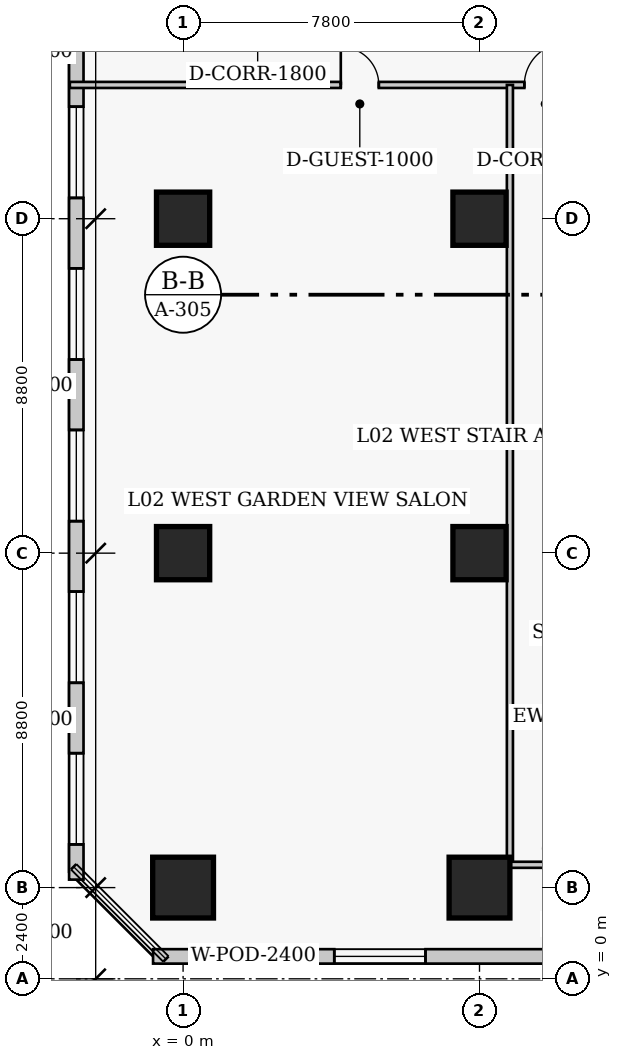
"""IFC4 building model, lengths in metres.
Left out: names, types, materials, properties, quantities, classifications, styles, units other than length and angle.
Written with IfcOpenShell. Run it as: python <this file> out.ifc"""

import sys

from ifc_helpers import new_model, si_unit, direction, frame, frame_2d, origin, origin_2d, place, context, subcontext, project, spatial, rectangle, extrude, element, fill, save


model = new_model("IFC4")
c1 = context("Model", 3, precision=1e-05, world=origin(), true_north=direction((0.0, 1.0)))
c2 = subcontext(c1, "Body", "Model", "MODEL_VIEW")
j1 = project(units=[si_unit("LENGTHUNIT", "METRE"), si_unit("PLANEANGLEUNIT", "RADIAN")], contexts=[c1])
p1 = place(None, origin())
s1 = spatial("IfcSite", under=j1, at=p1, CompositionType="ELEMENT")
p2 = place(p1, origin())
s2 = spatial("IfcBuilding", under=s1, at=p2, CompositionType="ELEMENT")
p3 = place(p2, frame((0.0, 0.0, 10.4)))
s3 = spatial("IfcBuildingStorey", under=s2, at=p3, CompositionType="ELEMENT", Elevation=10.4)
p4 = place(p3, frame((0.0, 2.4, 0.0), z_axis=(0.0, 0.0, 1.0), x_axis=(1.0, 0.0, 0.0)))
e1 = element("IfcColumn", 1, at=p4, inside=s3, PredefinedType="COLUMN", context=c2, shape_type="SweptSolid", body=[
    extrude(rectangle(XDim=1.6, YDim=1.6, at=origin_2d()), origin(), (0.0, 0.0, 1.0), 5.4),
])
for number, where, z_axis, x_axis in (
    (2, (0.0, 11.2, 0.0), (0.0, 0.0, 1.0), (1.0, 0.0, 0.0)),
    (3, (0.0, 20.0, 0.0), (0.0, 0.0, 1.0), (1.0, 0.0, 0.0)),
):
    element("IfcColumn", number, at=place(p3, frame(where, z_axis=z_axis, x_axis=x_axis)), inside=s3, PredefinedType="COLUMN", context=c2, shape_type="SweptSolid", body=[
        extrude(rectangle(XDim=1.4, YDim=1.4, at=origin_2d()), origin(), (0.0, 0.0, 1.0), 5.4),
    ])
p5 = place(p3, frame((7.8, 2.4, 0.0), z_axis=(0.0, 0.0, 1.0), x_axis=(1.0, 0.0, 0.0)))
e4 = element("IfcColumn", 4, at=p5, inside=s3, PredefinedType="COLUMN", context=c2, shape_type="SweptSolid", body=[
    extrude(rectangle(XDim=1.6, YDim=1.6, at=origin_2d()), origin(), (0.0, 0.0, 1.0), 5.4),
])
for number, where, z_axis, x_axis in (
    (5, (7.8, 11.2, 0.0), (0.0, 0.0, 1.0), (1.0, 0.0, 0.0)),
    (6, (7.8, 20.0, 0.0), (0.0, 0.0, 1.0), (1.0, 0.0, 0.0)),
):
    element("IfcColumn", number, at=place(p3, frame(where, z_axis=z_axis, x_axis=x_axis)), inside=s3, PredefinedType="COLUMN", context=c2, shape_type="SweptSolid", body=[
        extrude(rectangle(XDim=1.4, YDim=1.4, at=origin_2d()), origin(), (0.0, 0.0, 1.0), 5.4),
    ])
p6 = place(p3, frame((-0.79, 0.59, 0.0), z_axis=(0.0, 0.0, 1.0), x_axis=(1.0, 0.0, 0.0)))
e7 = element("IfcWall", 7, at=p6, inside=s3, PredefinedType="SOLIDWALL", context=c2, shape_type="SweptSolid", body=[
    extrude(rectangle(XDim=79.58, YDim=0.38, at=frame_2d((39.79, 0.0))), origin(), (0.0, 0.0, 1.0), 5.1),
])
p7 = place(p6, frame((1.439, 0.0, 0.75)))
e8 = element("IfcOpeningElement", 8, at=p7, cuts=e7, PredefinedType="OPENING", context=c2, shape_type="SweptSolid", body=[
    extrude(rectangle(XDim=2.4, YDim=2.2, at=frame_2d((1.2, 1.1))), frame((0.0, 0.2, 0.0), z_axis=(0.0, -1.0, 0.0), x_axis=(1.0, 0.0, 0.0)), (0.0, 0.0, 1.0), 0.4),
])
p8 = place(p6, frame((4.769, 0.0, 0.75)))
e9 = element("IfcOpeningElement", 9, at=p8, cuts=e7, PredefinedType="OPENING", context=c2, shape_type="SweptSolid", body=[
    extrude(rectangle(XDim=2.4, YDim=2.2, at=frame_2d((1.2, 1.1))), frame((0.0, 0.2, 0.0), z_axis=(0.0, -1.0, 0.0), x_axis=(1.0, 0.0, 0.0)), (0.0, 0.0, 1.0), 0.4),
])
p9 = place(p6, frame((16.706, 0.0, 0.75)))
e10 = element("IfcOpeningElement", 10, at=p9, cuts=e7, PredefinedType="OPENING", context=c2, shape_type="SweptSolid", body=[
    extrude(rectangle(XDim=2.4, YDim=2.2, at=frame_2d((1.2, 1.1))), frame((0.0, 0.2, 0.0), z_axis=(0.0, -1.0, 0.0), x_axis=(1.0, 0.0, 0.0)), (0.0, 0.0, 1.0), 0.4),
])
p10 = place(p6, frame((20.685, 0.0, 0.75)))
e11 = element("IfcOpeningElement", 11, at=p10, cuts=e7, PredefinedType="OPENING", context=c2, shape_type="SweptSolid", body=[
    extrude(rectangle(XDim=2.4, YDim=2.2, at=frame_2d((1.2, 1.1))), frame((0.0, 0.2, 0.0), z_axis=(0.0, -1.0, 0.0), x_axis=(1.0, 0.0, 0.0)), (0.0, 0.0, 1.0), 0.4),
])
p11 = place(p6, frame((24.664, 0.0, 0.75)))
e12 = element("IfcOpeningElement", 12, at=p11, cuts=e7, PredefinedType="OPENING", context=c2, shape_type="SweptSolid", body=[
    extrude(rectangle(XDim=2.4, YDim=2.2, at=frame_2d((1.2, 1.1))), frame((0.0, 0.2, 0.0), z_axis=(0.0, -1.0, 0.0), x_axis=(1.0, 0.0, 0.0)), (0.0, 0.0, 1.0), 0.4),
])
p12 = place(p6, frame((28.643, 0.0, 0.75)))
e13 = element("IfcOpeningElement", 13, at=p12, cuts=e7, PredefinedType="OPENING", context=c2, shape_type="SweptSolid", body=[
    extrude(rectangle(XDim=2.4, YDim=2.2, at=frame_2d((1.2, 1.1))), frame((0.0, 0.2, 0.0), z_axis=(0.0, -1.0, 0.0), x_axis=(1.0, 0.0, 0.0)), (0.0, 0.0, 1.0), 0.4),
])
p13 = place(p6, frame((33.271, 0.0, 0.75)))
e14 = element("IfcOpeningElement", 14, at=p13, cuts=e7, PredefinedType="OPENING", context=c2, shape_type="SweptSolid", body=[
    extrude(rectangle(XDim=2.4, YDim=2.2, at=frame_2d((1.2, 1.1))), frame((0.0, 0.2, 0.0), z_axis=(0.0, -1.0, 0.0), x_axis=(1.0, 0.0, 0.0)), (0.0, 0.0, 1.0), 0.4),
])
p14 = place(p6, frame((37.75, 0.0, 0.75)))
e15 = element("IfcOpeningElement", 15, at=p14, cuts=e7, PredefinedType="OPENING", context=c2, shape_type="SweptSolid", body=[
    extrude(rectangle(XDim=2.4, YDim=2.2, at=frame_2d((1.2, 1.1))), frame((0.0, 0.2, 0.0), z_axis=(0.0, -1.0, 0.0), x_axis=(1.0, 0.0, 0.0)), (0.0, 0.0, 1.0), 0.4),
])
p15 = place(p6, frame((44.559, 0.0, 0.75)))
e16 = element("IfcOpeningElement", 16, at=p15, cuts=e7, PredefinedType="OPENING", context=c2, shape_type="SweptSolid", body=[
    extrude(rectangle(XDim=2.4, YDim=2.2, at=frame_2d((1.2, 1.1))), frame((0.0, 0.2, 0.0), z_axis=(0.0, -1.0, 0.0), x_axis=(1.0, 0.0, 0.0)), (0.0, 0.0, 1.0), 0.4),
])
p16 = place(p6, frame((48.538, 0.0, 0.75)))
e17 = element("IfcOpeningElement", 17, at=p16, cuts=e7, PredefinedType="OPENING", context=c2, shape_type="SweptSolid", body=[
    extrude(rectangle(XDim=2.4, YDim=2.2, at=frame_2d((1.2, 1.1))), frame((0.0, 0.2, 0.0), z_axis=(0.0, -1.0, 0.0), x_axis=(1.0, 0.0, 0.0)), (0.0, 0.0, 1.0), 0.4),
])
p17 = place(p6, frame((52.517, 0.0, 0.75)))
e18 = element("IfcOpeningElement", 18, at=p17, cuts=e7, PredefinedType="OPENING", context=c2, shape_type="SweptSolid", body=[
    extrude(rectangle(XDim=2.4, YDim=2.2, at=frame_2d((1.2, 1.1))), frame((0.0, 0.2, 0.0), z_axis=(0.0, -1.0, 0.0), x_axis=(1.0, 0.0, 0.0)), (0.0, 0.0, 1.0), 0.4),
])
p18 = place(p6, frame((56.496, 0.0, 0.75)))
e19 = element("IfcOpeningElement", 19, at=p18, cuts=e7, PredefinedType="OPENING", context=c2, shape_type="SweptSolid", body=[
    extrude(rectangle(XDim=2.4, YDim=2.2, at=frame_2d((1.2, 1.1))), frame((0.0, 0.2, 0.0), z_axis=(0.0, -1.0, 0.0), x_axis=(1.0, 0.0, 0.0)), (0.0, 0.0, 1.0), 0.4),
])
p19 = place(p6, frame((60.475, 0.0, 0.75)))
e20 = element("IfcOpeningElement", 20, at=p19, cuts=e7, PredefinedType="OPENING", context=c2, shape_type="SweptSolid", body=[
    extrude(rectangle(XDim=2.4, YDim=2.2, at=frame_2d((1.2, 1.1))), frame((0.0, 0.2, 0.0), z_axis=(0.0, -1.0, 0.0), x_axis=(1.0, 0.0, 0.0)), (0.0, 0.0, 1.0), 0.4),
])
p20 = place(p6, frame((64.454, 0.0, 0.75)))
e21 = element("IfcOpeningElement", 21, at=p20, cuts=e7, PredefinedType="OPENING", context=c2, shape_type="SweptSolid", body=[
    extrude(rectangle(XDim=2.4, YDim=2.2, at=frame_2d((1.2, 1.1))), frame((0.0, 0.2, 0.0), z_axis=(0.0, -1.0, 0.0), x_axis=(1.0, 0.0, 0.0)), (0.0, 0.0, 1.0), 0.4),
])
p21 = place(p6, frame((68.433, 0.0, 0.75)))
e22 = element("IfcOpeningElement", 22, at=p21, cuts=e7, PredefinedType="OPENING", context=c2, shape_type="SweptSolid", body=[
    extrude(rectangle(XDim=2.4, YDim=2.2, at=frame_2d((1.2, 1.1))), frame((0.0, 0.2, 0.0), z_axis=(0.0, -1.0, 0.0), x_axis=(1.0, 0.0, 0.0)), (0.0, 0.0, 1.0), 0.4),
])
p22 = place(p6, frame((72.412, 0.0, 0.75)))
e23 = element("IfcOpeningElement", 23, at=p22, cuts=e7, PredefinedType="OPENING", context=c2, shape_type="SweptSolid", body=[
    extrude(rectangle(XDim=2.4, YDim=2.2, at=frame_2d((1.2, 1.1))), frame((0.0, 0.2, 0.0), z_axis=(0.0, -1.0, 0.0), x_axis=(1.0, 0.0, 0.0)), (0.0, 0.0, 1.0), 0.4),
])
p23 = place(p6, frame((75.74, 0.0, 0.75)))
e24 = element("IfcOpeningElement", 24, at=p23, cuts=e7, PredefinedType="OPENING", context=c2, shape_type="SweptSolid", body=[
    extrude(rectangle(XDim=2.4, YDim=2.2, at=frame_2d((1.2, 1.1))), frame((0.0, 0.2, 0.0), z_axis=(0.0, -1.0, 0.0), x_axis=(1.0, 0.0, 0.0)), (0.0, 0.0, 1.0), 0.4),
])
p24 = place(p3, frame((-2.81, 49.39, 0.0), z_axis=(0.0, 0.0, 1.0), x_axis=(0.0, -1.0, 0.0)))
e25 = element("IfcWall", 25, at=p24, inside=s3, PredefinedType="SOLIDWALL", context=c2, shape_type="SweptSolid", body=[
    extrude(rectangle(XDim=46.78, YDim=0.38, at=frame_2d((23.39, 0.0))), origin(), (0.0, 0.0, 1.0), 5.1),
])
p25 = place(p24, frame((0.927, 0.0, 0.75)))
e26 = element("IfcOpeningElement", 26, at=p25, cuts=e25, PredefinedType="OPENING", context=c2, shape_type="SweptSolid", body=[
    extrude(rectangle(XDim=2.4, YDim=2.2, at=frame_2d((1.2, 1.1))), frame((0.0, 0.2, 0.0), z_axis=(0.0, -1.0, 0.0), x_axis=(1.0, 0.0, 0.0)), (0.0, 0.0, 1.0), 0.4),
])
p26 = place(p24, frame((5.179, 0.0, 0.75)))
e27 = element("IfcOpeningElement", 27, at=p26, cuts=e25, PredefinedType="OPENING", context=c2, shape_type="SweptSolid", body=[
    extrude(rectangle(XDim=2.4, YDim=2.2, at=frame_2d((1.2, 1.1))), frame((0.0, 0.2, 0.0), z_axis=(0.0, -1.0, 0.0), x_axis=(1.0, 0.0, 0.0)), (0.0, 0.0, 1.0), 0.4),
])
p27 = place(p24, frame((9.432, 0.0, 0.75)))
e28 = element("IfcOpeningElement", 28, at=p27, cuts=e25, PredefinedType="OPENING", context=c2, shape_type="SweptSolid", body=[
    extrude(rectangle(XDim=2.4, YDim=2.2, at=frame_2d((1.2, 1.1))), frame((0.0, 0.2, 0.0), z_axis=(0.0, -1.0, 0.0), x_axis=(1.0, 0.0, 0.0)), (0.0, 0.0, 1.0), 0.4),
])
p28 = place(p24, frame((13.685, 0.0, 0.75)))
e29 = element("IfcOpeningElement", 29, at=p28, cuts=e25, PredefinedType="OPENING", context=c2, shape_type="SweptSolid", body=[
    extrude(rectangle(XDim=2.4, YDim=2.2, at=frame_2d((1.2, 1.1))), frame((0.0, 0.2, 0.0), z_axis=(0.0, -1.0, 0.0), x_axis=(1.0, 0.0, 0.0)), (0.0, 0.0, 1.0), 0.4),
])
p29 = place(p24, frame((17.937, 0.0, 0.75)))
e30 = element("IfcOpeningElement", 30, at=p29, cuts=e25, PredefinedType="OPENING", context=c2, shape_type="SweptSolid", body=[
    extrude(rectangle(XDim=2.4, YDim=2.2, at=frame_2d((1.2, 1.1))), frame((0.0, 0.2, 0.0), z_axis=(0.0, -1.0, 0.0), x_axis=(1.0, 0.0, 0.0)), (0.0, 0.0, 1.0), 0.4),
])
p30 = place(p24, frame((26.443, 0.0, 0.75)))
e31 = element("IfcOpeningElement", 31, at=p30, cuts=e25, PredefinedType="OPENING", context=c2, shape_type="SweptSolid", body=[
    extrude(rectangle(XDim=2.4, YDim=2.2, at=frame_2d((1.2, 1.1))), frame((0.0, 0.2, 0.0), z_axis=(0.0, -1.0, 0.0), x_axis=(1.0, 0.0, 0.0)), (0.0, 0.0, 1.0), 0.4),
])
p31 = place(p24, frame((30.696, 0.0, 0.75)))
e32 = element("IfcOpeningElement", 32, at=p31, cuts=e25, PredefinedType="OPENING", context=c2, shape_type="SweptSolid", body=[
    extrude(rectangle(XDim=2.4, YDim=2.2, at=frame_2d((1.2, 1.1))), frame((0.0, 0.2, 0.0), z_axis=(0.0, -1.0, 0.0), x_axis=(1.0, 0.0, 0.0)), (0.0, 0.0, 1.0), 0.4),
])
p32 = place(p24, frame((34.948, 0.0, 0.75)))
e33 = element("IfcOpeningElement", 33, at=p32, cuts=e25, PredefinedType="OPENING", context=c2, shape_type="SweptSolid", body=[
    extrude(rectangle(XDim=2.4, YDim=2.2, at=frame_2d((1.2, 1.1))), frame((0.0, 0.2, 0.0), z_axis=(0.0, -1.0, 0.0), x_axis=(1.0, 0.0, 0.0)), (0.0, 0.0, 1.0), 0.4),
])
p33 = place(p24, frame((39.201, 0.0, 0.75)))
e34 = element("IfcOpeningElement", 34, at=p33, cuts=e25, PredefinedType="OPENING", context=c2, shape_type="SweptSolid", body=[
    extrude(rectangle(XDim=2.4, YDim=2.2, at=frame_2d((1.2, 1.1))), frame((0.0, 0.2, 0.0), z_axis=(0.0, -1.0, 0.0), x_axis=(1.0, 0.0, 0.0)), (0.0, 0.0, 1.0), 0.4),
])
p34 = place(p24, frame((43.454, 0.0, 0.75)))
e35 = element("IfcOpeningElement", 35, at=p34, cuts=e25, PredefinedType="OPENING", context=c2, shape_type="SweptSolid", body=[
    extrude(rectangle(XDim=2.4, YDim=2.2, at=frame_2d((1.2, 1.1))), frame((0.0, 0.2, 0.0), z_axis=(0.0, -1.0, 0.0), x_axis=(1.0, 0.0, 0.0)), (0.0, 0.0, 1.0), 0.4),
])
p35 = place(p3, frame((-2.98, 23.52, 0.0), z_axis=(0.0, 0.0, 1.0), x_axis=(1.0, 0.0, 0.0)))
e36 = element("IfcWall", 36, at=p35, inside=s3, PredefinedType="PARTITIONING", context=c2, shape_type="SweptSolid", body=[
    extrude(rectangle(XDim=83.96, YDim=0.16, at=frame_2d((41.98, 0.0))), origin(), (0.0, 0.0, 1.0), 5.1),
])
p36 = place(p35, frame((7.13, 0.0, 0.0)))
e37 = element("IfcOpeningElement", 37, at=p36, cuts=e36, PredefinedType="OPENING", context=c2, shape_type="SweptSolid", body=[
    extrude(rectangle(XDim=1.0, YDim=2.15, at=frame_2d((0.5, 1.075))), frame((0.0, 0.09, 0.0), z_axis=(0.0, -1.0, 0.0), x_axis=(1.0, 0.0, 0.0)), (0.0, 0.0, 1.0), 0.18),
])
p37 = place(p35, frame((11.96, 0.0, 0.0)))
e38 = element("IfcOpeningElement", 38, at=p37, cuts=e36, PredefinedType="OPENING", context=c2, shape_type="SweptSolid", body=[
    extrude(rectangle(XDim=1.1, YDim=2.15, at=frame_2d((0.55, 1.075))), frame((0.0, 0.09, 0.0), z_axis=(0.0, -1.0, 0.0), x_axis=(1.0, 0.0, 0.0)), (0.0, 0.0, 1.0), 0.18),
])
p38 = place(p35, frame((45.93, 0.0, 0.0)))
e39 = element("IfcOpeningElement", 39, at=p38, cuts=e36, PredefinedType="OPENING", context=c2, shape_type="SweptSolid", body=[
    extrude(rectangle(XDim=1.1, YDim=2.15, at=frame_2d((0.55, 1.075))), frame((0.0, 0.09, 0.0), z_axis=(0.0, -1.0, 0.0), x_axis=(1.0, 0.0, 0.0)), (0.0, 0.0, 1.0), 0.18),
])
p39 = place(p35, frame((15.205, 0.0, 0.0)))
e40 = element("IfcOpeningElement", 40, at=p39, cuts=e36, PredefinedType="OPENING", context=c2, shape_type="SweptSolid", body=[
    extrude(rectangle(XDim=0.95, YDim=2.1, at=frame_2d((0.475, 1.05))), frame((0.0, 0.09, 0.0), z_axis=(0.0, -1.0, 0.0), x_axis=(1.0, 0.0, 0.0)), (0.0, 0.0, 1.0), 0.18),
])
p40 = place(p35, frame((32.755, 0.0, 0.0)))
e41 = element("IfcOpeningElement", 41, at=p40, cuts=e36, PredefinedType="OPENING", context=c2, shape_type="SweptSolid", body=[
    extrude(rectangle(XDim=2.2, YDim=2.4, at=frame_2d((1.1, 1.2))), frame((0.0, 0.09, 0.0), z_axis=(0.0, -1.0, 0.0), x_axis=(1.0, 0.0, 0.0)), (0.0, 0.0, 1.0), 0.18),
])
p41 = place(p35, frame((55.455, 0.0, 0.0)))
e42 = element("IfcOpeningElement", 42, at=p41, cuts=e36, PredefinedType="OPENING", context=c2, shape_type="SweptSolid", body=[
    extrude(rectangle(XDim=2.2, YDim=2.4, at=frame_2d((1.1, 1.2))), frame((0.0, 0.09, 0.0), z_axis=(0.0, -1.0, 0.0), x_axis=(1.0, 0.0, 0.0)), (0.0, 0.0, 1.0), 0.18),
])
p42 = place(p35, frame((67.34, 0.0, 0.0)))
e43 = element("IfcOpeningElement", 43, at=p42, cuts=e36, PredefinedType="OPENING", context=c2, shape_type="SweptSolid", body=[
    extrude(rectangle(XDim=0.88, YDim=2.05, at=frame_2d((0.44, 1.025))), frame((0.0, 0.09, 0.0), z_axis=(0.0, -1.0, 0.0), x_axis=(1.0, 0.0, 0.0)), (0.0, 0.0, 1.0), 0.18),
])
p43 = place(p35, frame((76.29, 0.0, 0.0)))
e44 = element("IfcOpeningElement", 44, at=p43, cuts=e36, PredefinedType="OPENING", context=c2, shape_type="SweptSolid", body=[
    extrude(rectangle(XDim=0.88, YDim=2.05, at=frame_2d((0.44, 1.025))), frame((0.0, 0.09, 0.0), z_axis=(0.0, -1.0, 0.0), x_axis=(1.0, 0.0, 0.0)), (0.0, 0.0, 1.0), 0.18),
])
p44 = place(p3, frame((8.6, 3.0, 0.0), z_axis=(0.0, 0.0, 1.0), x_axis=(0.0, 1.0, 0.0)))
e45 = element("IfcWall", 45, at=p44, inside=s3, PredefinedType="PARTITIONING", context=c2, shape_type="SweptSolid", body=[
    extrude(rectangle(XDim=20.52, YDim=0.16, at=frame_2d((10.26, 0.0))), origin(), (0.0, 0.0, 1.0), 5.1),
])
p45 = place(p3, frame((8.6, 3.0, 0.0), z_axis=(0.0, 0.0, 1.0), x_axis=(1.0, 0.0, 0.0)))
e46 = element("IfcWall", 46, at=p45, inside=s3, PredefinedType="PARTITIONING", context=c2, shape_type="SweptSolid", body=[
    extrude(rectangle(XDim=1.79, YDim=0.16, at=frame_2d((0.895, 0.0))), origin(), (0.0, 0.0, 1.0), 5.1),
])
p46 = place(p7, origin())
e47 = element("IfcWindow", 47, at=p46, inside=s3, PartitioningType="SINGLE_PANEL", PredefinedType="WINDOW", context=c2, shape_type="SweptSolid", body=[
    extrude(rectangle(XDim=2.4, YDim=2.2, at=frame_2d((1.2, 1.1))), frame((0.0, 0.03, 0.0), z_axis=(0.0, -1.0, 0.0), x_axis=(1.0, 0.0, 0.0)), (0.0, 0.0, 1.0), 0.06),
])
fill(e8, e47)
p47 = place(p8, origin())
e48 = element("IfcWindow", 48, at=p47, inside=s3, PartitioningType="SINGLE_PANEL", PredefinedType="WINDOW", context=c2, shape_type="SweptSolid", body=[
    extrude(rectangle(XDim=2.4, YDim=2.2, at=frame_2d((1.2, 1.1))), frame((0.0, 0.03, 0.0), z_axis=(0.0, -1.0, 0.0), x_axis=(1.0, 0.0, 0.0)), (0.0, 0.0, 1.0), 0.06),
])
fill(e9, e48)
p48 = place(p30, origin())
e49 = element("IfcWindow", 49, at=p48, inside=s3, PartitioningType="SINGLE_PANEL", PredefinedType="WINDOW", context=c2, shape_type="SweptSolid", body=[
    extrude(rectangle(XDim=2.4, YDim=2.2, at=frame_2d((1.2, 1.1))), frame((0.0, 0.03, 0.0), z_axis=(0.0, -1.0, 0.0), x_axis=(1.0, 0.0, 0.0)), (0.0, 0.0, 1.0), 0.06),
])
fill(e31, e49)
p49 = place(p31, origin())
e50 = element("IfcWindow", 50, at=p49, inside=s3, PartitioningType="SINGLE_PANEL", PredefinedType="WINDOW", context=c2, shape_type="SweptSolid", body=[
    extrude(rectangle(XDim=2.4, YDim=2.2, at=frame_2d((1.2, 1.1))), frame((0.0, 0.03, 0.0), z_axis=(0.0, -1.0, 0.0), x_axis=(1.0, 0.0, 0.0)), (0.0, 0.0, 1.0), 0.06),
])
fill(e32, e50)
p50 = place(p32, origin())
e51 = element("IfcWindow", 51, at=p50, inside=s3, PartitioningType="SINGLE_PANEL", PredefinedType="WINDOW", context=c2, shape_type="SweptSolid", body=[
    extrude(rectangle(XDim=2.4, YDim=2.2, at=frame_2d((1.2, 1.1))), frame((0.0, 0.03, 0.0), z_axis=(0.0, -1.0, 0.0), x_axis=(1.0, 0.0, 0.0)), (0.0, 0.0, 1.0), 0.06),
])
fill(e33, e51)
p51 = place(p33, origin())
e52 = element("IfcWindow", 52, at=p51, inside=s3, PartitioningType="SINGLE_PANEL", PredefinedType="WINDOW", context=c2, shape_type="SweptSolid", body=[
    extrude(rectangle(XDim=2.4, YDim=2.2, at=frame_2d((1.2, 1.1))), frame((0.0, 0.03, 0.0), z_axis=(0.0, -1.0, 0.0), x_axis=(1.0, 0.0, 0.0)), (0.0, 0.0, 1.0), 0.06),
])
fill(e34, e52)
p52 = place(p34, origin())
e53 = element("IfcWindow", 53, at=p52, inside=s3, PartitioningType="SINGLE_PANEL", PredefinedType="WINDOW", context=c2, shape_type="SweptSolid", body=[
    extrude(rectangle(XDim=2.4, YDim=2.2, at=frame_2d((1.2, 1.1))), frame((0.0, 0.03, 0.0), z_axis=(0.0, -1.0, 0.0), x_axis=(1.0, 0.0, 0.0)), (0.0, 0.0, 1.0), 0.06),
])
fill(e35, e53)
p53 = place(p36, origin())
e54 = element("IfcDoor", 54, at=p53, inside=s3, OperationType="SINGLE_SWING_LEFT", PredefinedType="DOOR", context=c2, shape_type="SweptSolid", body=[
    extrude(rectangle(XDim=1.0, YDim=2.15, at=frame_2d((0.5, 1.075))), frame((0.0, 0.025, 0.0), z_axis=(0.0, -1.0, 0.0), x_axis=(1.0, 0.0, 0.0)), (0.0, 0.0, 1.0), 0.05),
])
fill(e37, e54)
p54 = place(p37, origin())
e55 = element("IfcDoor", 55, at=p54, inside=s3, OperationType="SINGLE_SWING_RIGHT", PredefinedType="DOOR", context=c2, shape_type="SweptSolid", body=[
    extrude(rectangle(XDim=1.1, YDim=2.15, at=frame_2d((0.55, 1.075))), frame((0.0, 0.025, 0.0), z_axis=(0.0, -1.0, 0.0), x_axis=(1.0, 0.0, 0.0)), (0.0, 0.0, 1.0), 0.05),
])
fill(e38, e55)
save(model, sys.argv[1])
